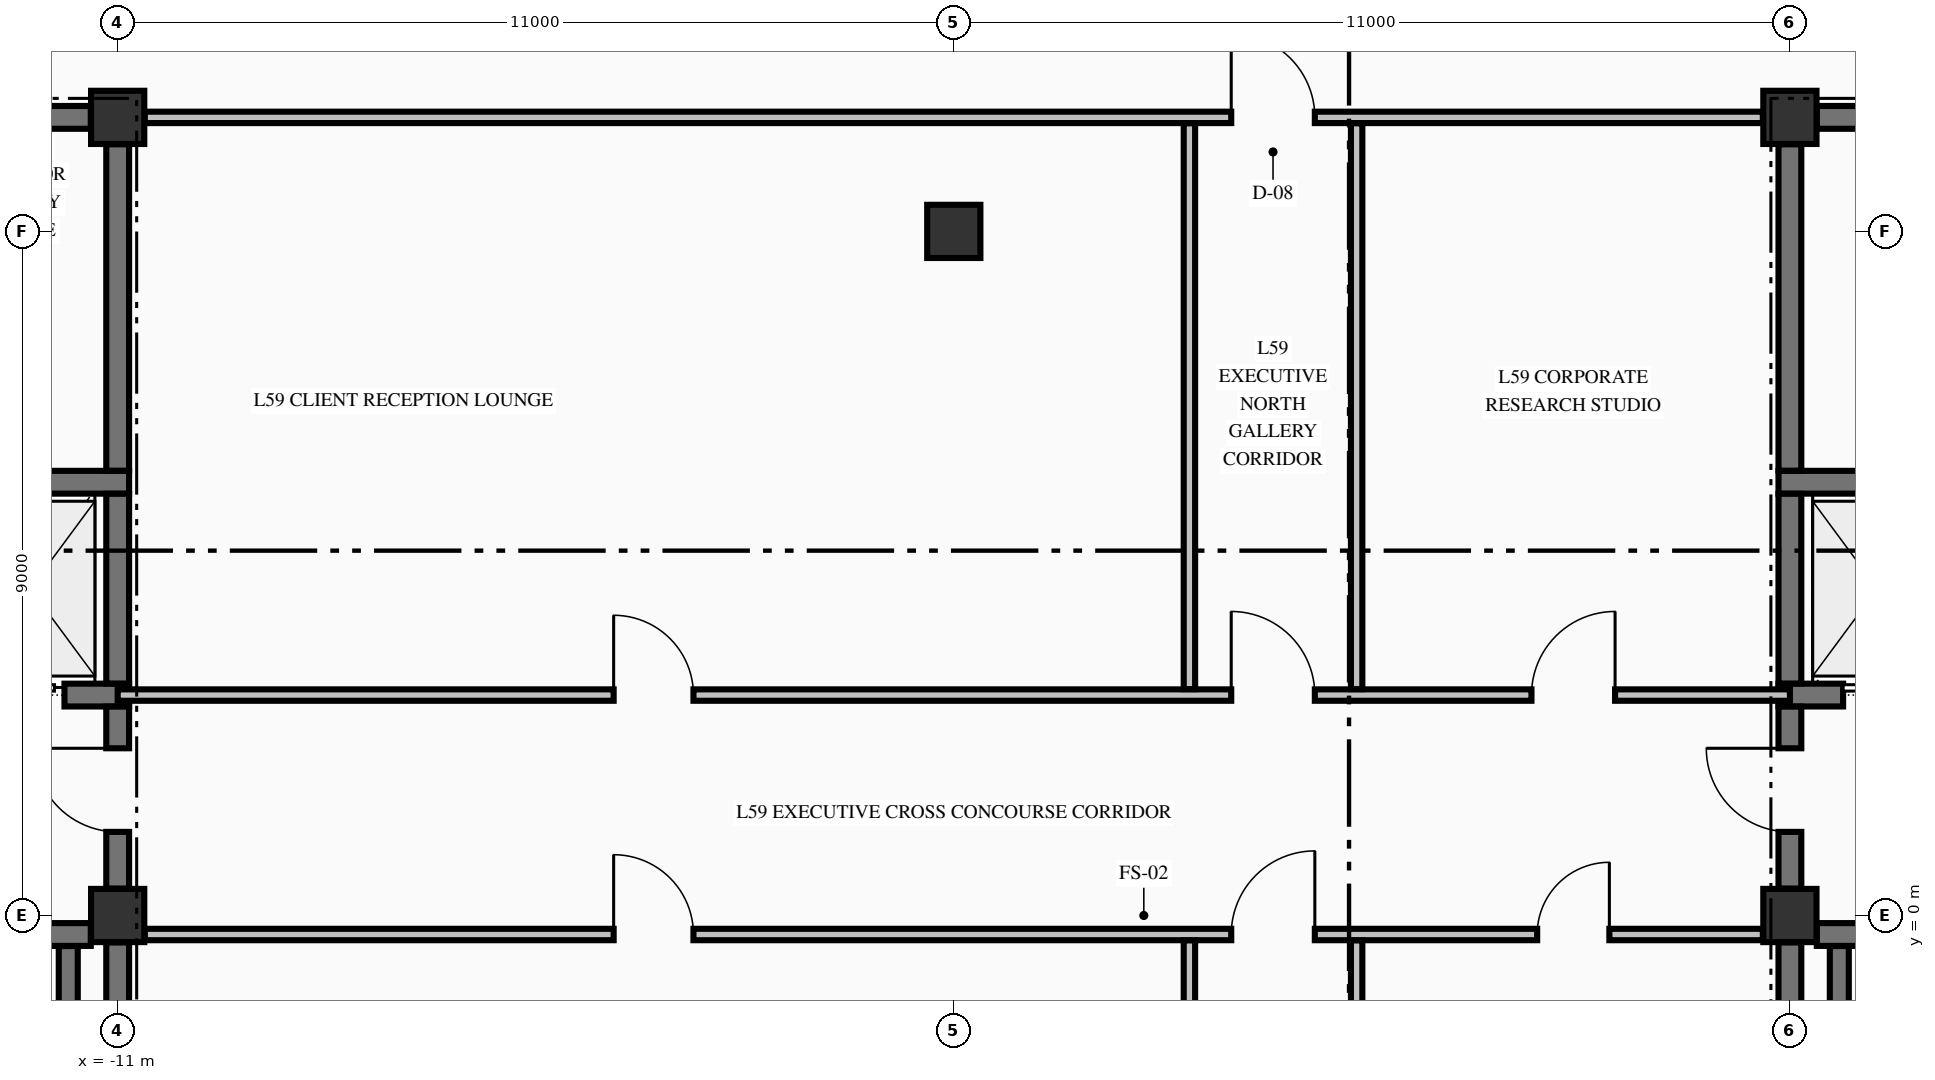
"""IFC4 building model, lengths in metres.
Left out: names, types, materials, properties, quantities, classifications, styles, units other than length and angle.
Written with IfcOpenShell. Run it as: python <this file> out.ifc"""

import sys

from ifc_helpers import new_model, si_unit, direction, frame, frame_2d, origin, origin_2d, place, context, subcontext, project, spatial, rectangle, extrude, element, fill, save


model = new_model("IFC4")
c1 = context("Model", 3, precision=1e-05, world=origin(), true_north=direction((0.0, 1.0)))
c2 = subcontext(c1, "Body", "Model", "MODEL_VIEW")
j1 = project(units=[si_unit("LENGTHUNIT", "METRE"), si_unit("PLANEANGLEUNIT", "RADIAN")], contexts=[c1])
p1 = place(None, origin())
s1 = spatial("IfcSite", under=j1, at=p1, CompositionType="ELEMENT")
p2 = place(p1, origin())
s2 = spatial("IfcBuilding", under=s1, at=p2, CompositionType="ELEMENT")
p3 = place(p2, frame((0.0, 0.0, 226.82)))
s3 = spatial("IfcBuildingStorey", under=s2, at=p3, CompositionType="ELEMENT", Elevation=226.82)
for number, where, z_axis, x_axis in (
    (1, (-11.0, 0.0, -0.425), (0.0, 0.0, 1.0), (1.0, 0.0, 0.0)),
    (2, (-11.0, 10.5, -0.425), (0.0, 0.0, 1.0), (1.0, 0.0, 0.0)),
    (3, (11.0, 0.0, -0.425), (0.0, 0.0, 1.0), (1.0, 0.0, 0.0)),
    (4, (11.0, 10.5, -0.425), (0.0, 0.0, 1.0), (1.0, 0.0, 0.0)),
    (5, (0.0, 9.0, -0.425), (0.0, 0.0, 1.0), (1.0, 0.0, 0.0)),
):
    element("IfcColumn", number, at=place(p3, frame(where, z_axis=z_axis, x_axis=x_axis)), inside=s3, PredefinedType="COLUMN", context=c2, shape_type="SweptSolid", body=[
        extrude(rectangle(XDim=0.7, YDim=0.7, at=origin_2d()), origin(), (0.0, 0.0, 1.0), 3.405),
    ])
p4 = place(p3, frame((-20.571, -0.25, 0.0), z_axis=(0.0, 0.0, 1.0), x_axis=(1.0, 0.0, 0.0)))
e6 = element("IfcWall", 6, at=p4, inside=s3, PredefinedType="SHEAR", context=c2, shape_type="SweptSolid", body=[
    extrude(rectangle(XDim=9.217, YDim=0.3, at=frame_2d((4.608, 0.0))), origin(), (0.0, 0.0, 1.0), 2.98),
])
p5 = place(p4, frame((6.871, 0.0, 0.0)))
e7 = element("IfcOpeningElement", 7, at=p5, cuts=e6, PredefinedType="OPENING", context=c2, shape_type="SweptSolid", body=[
    extrude(rectangle(XDim=1.1, YDim=2.15, at=frame_2d((0.55, 1.075))), frame((0.0, 0.16, 0.0), z_axis=(0.0, -1.0, 0.0), x_axis=(1.0, 0.0, 0.0)), (0.0, 0.0, 1.0), 0.32),
])
p6 = place(p3, frame((11.354, -0.25, 0.0), z_axis=(0.0, 0.0, 1.0), x_axis=(1.0, 0.0, 0.0)))
e8 = element("IfcWall", 8, at=p6, inside=s3, PredefinedType="SHEAR", context=c2, shape_type="SweptSolid", body=[
    extrude(rectangle(XDim=3.521, YDim=0.3, at=frame_2d((1.76, 0.0))), origin(), (0.0, 0.0, 1.0), 2.98),
])
p7 = place(p6, frame((1.246, 0.0, 0.0)))
e9 = element("IfcOpeningElement", 9, at=p7, cuts=e8, PredefinedType="OPENING", context=c2, shape_type="SweptSolid", body=[
    extrude(rectangle(XDim=1.1, YDim=2.15, at=frame_2d((0.55, 1.075))), frame((0.0, 0.16, 0.0), z_axis=(0.0, -1.0, 0.0), x_axis=(1.0, 0.0, 0.0)), (0.0, 0.0, 1.0), 0.32),
])
p8 = place(p3, frame((-14.875, 2.9, 0.0), z_axis=(0.0, 0.0, 1.0), x_axis=(1.0, 0.0, 0.0)))
e10 = element("IfcWall", 10, at=p8, inside=s3, PredefinedType="SHEAR", context=c2, shape_type="SweptSolid", body=[
    extrude(rectangle(XDim=4.025, YDim=0.3, at=frame_2d((2.012, 0.0))), origin(), (0.0, 0.0, 1.0), 2.98),
])
p9 = place(p8, frame((2.075, 0.0, 0.0)))
e11 = element("IfcOpeningElement", 11, at=p9, cuts=e10, PredefinedType="OPENING", context=c2, shape_type="SweptSolid", body=[
    extrude(rectangle(XDim=1.1, YDim=2.2, at=frame_2d((0.55, 1.1))), frame((0.0, 0.16, 0.0), z_axis=(0.0, -1.0, 0.0), x_axis=(1.0, 0.0, 0.0)), (0.0, 0.0, 1.0), 0.32),
])
p10 = place(p3, frame((10.85, 2.9, 0.0), z_axis=(0.0, 0.0, 1.0), x_axis=(1.0, 0.0, 0.0)))
e12 = element("IfcWall", 12, at=p10, inside=s3, PredefinedType="SHEAR", context=c2, shape_type="SweptSolid", body=[
    extrude(rectangle(XDim=4.025, YDim=0.3, at=frame_2d((2.012, 0.0))), origin(), (0.0, 0.0, 1.0), 2.98),
])
p11 = place(p10, frame((0.85, 0.0, 0.0)))
e13 = element("IfcOpeningElement", 13, at=p11, cuts=e12, PredefinedType="OPENING", context=c2, shape_type="SweptSolid", body=[
    extrude(rectangle(XDim=1.1, YDim=2.2, at=frame_2d((0.55, 1.1))), frame((0.0, 0.16, 0.0), z_axis=(0.0, -1.0, 0.0), x_axis=(1.0, 0.0, 0.0)), (0.0, 0.0, 1.0), 0.32),
])
for number, where, z_axis, x_axis in (
    (14, (-14.875, 5.7, 0.0), (0.0, 0.0, 1.0), (1.0, 0.0, 0.0)),
    (15, (10.85, 5.7, 0.0), (0.0, 0.0, 1.0), (1.0, 0.0, 0.0)),
):
    element("IfcWall", number, at=place(p3, frame(where, z_axis=z_axis, x_axis=x_axis)), inside=s3, PredefinedType="SHEAR", context=c2, shape_type="SweptSolid", body=[
        extrude(rectangle(XDim=4.025, YDim=0.3, at=frame_2d((2.012, 0.0))), origin(), (0.0, 0.0, 1.0), 2.98),
    ])
p12 = place(p3, frame((-14.7, 10.5, 0.0), z_axis=(0.0, 0.0, 1.0), x_axis=(1.0, 0.0, 0.0)))
e16 = element("IfcWall", 16, at=p12, inside=s3, PredefinedType="SHEAR", context=c2, shape_type="SweptSolid", body=[
    extrude(rectangle(XDim=3.346, YDim=0.3, at=frame_2d((1.673, 0.0))), origin(), (0.0, 0.0, 1.0), 2.98),
])
p13 = place(p12, frame((0.245, 0.0, 0.0)))
e17 = element("IfcOpeningElement", 17, at=p13, cuts=e16, PredefinedType="OPENING", context=c2, shape_type="SweptSolid", body=[
    extrude(rectangle(XDim=0.95, YDim=2.15, at=frame_2d((0.475, 1.075))), frame((0.0, 0.16, 0.0), z_axis=(0.0, -1.0, 0.0), x_axis=(1.0, 0.0, 0.0)), (0.0, 0.0, 1.0), 0.32),
])
p14 = place(p3, frame((11.354, 10.5, 0.0), z_axis=(0.0, 0.0, 1.0), x_axis=(1.0, 0.0, 0.0)))
e18 = element("IfcWall", 18, at=p14, inside=s3, PredefinedType="SHEAR", context=c2, shape_type="SweptSolid", body=[
    extrude(rectangle(XDim=3.346, YDim=0.3, at=frame_2d((1.673, 0.0))), origin(), (0.0, 0.0, 1.0), 2.98),
])
p15 = place(p14, frame((1.621, 0.0, 0.0)))
e19 = element("IfcOpeningElement", 19, at=p15, cuts=e18, PredefinedType="OPENING", context=c2, shape_type="SweptSolid", body=[
    extrude(rectangle(XDim=0.95, YDim=2.15, at=frame_2d((0.475, 1.075))), frame((0.0, 0.16, 0.0), z_axis=(0.0, -1.0, 0.0), x_axis=(1.0, 0.0, 0.0)), (0.0, 0.0, 1.0), 0.32),
])
p16 = place(p3, frame((-10.644, -0.25, 0.0), z_axis=(0.0, 0.0, 1.0), x_axis=(1.0, 0.0, 0.0)))
e20 = element("IfcWall", 20, at=p16, inside=s3, PredefinedType="PARTITIONING", context=c2, shape_type="SweptSolid", body=[
    extrude(rectangle(XDim=21.288, YDim=0.15, at=frame_2d((10.644, 0.0))), origin(), (0.0, 0.0, 1.0), 2.98),
])
p17 = place(p16, frame((14.294, 0.0, 0.0)))
e21 = element("IfcOpeningElement", 21, at=p17, cuts=e20, PredefinedType="OPENING", context=c2, shape_type="SweptSolid", body=[
    extrude(rectangle(XDim=1.1, YDim=2.15, at=frame_2d((0.55, 1.075))), frame((0.0, 0.085, 0.0), z_axis=(0.0, -1.0, 0.0), x_axis=(1.0, 0.0, 0.0)), (0.0, 0.0, 1.0), 0.17),
])
p18 = place(p16, frame((6.169, 0.0, 0.0)))
e22 = element("IfcOpeningElement", 22, at=p18, cuts=e20, PredefinedType="OPENING", context=c2, shape_type="SweptSolid", body=[
    extrude(rectangle(XDim=1.05, YDim=2.15, at=frame_2d((0.525, 1.075))), frame((0.0, 0.085, 0.0), z_axis=(0.0, -1.0, 0.0), x_axis=(1.0, 0.0, 0.0)), (0.0, 0.0, 1.0), 0.17),
])
p19 = place(p16, frame((18.319, 0.0, 0.0)))
e23 = element("IfcOpeningElement", 23, at=p19, cuts=e20, PredefinedType="OPENING", context=c2, shape_type="SweptSolid", body=[
    extrude(rectangle(XDim=0.95, YDim=2.15, at=frame_2d((0.475, 1.075))), frame((0.0, 0.085, 0.0), z_axis=(0.0, -1.0, 0.0), x_axis=(1.0, 0.0, 0.0)), (0.0, 0.0, 1.0), 0.17),
])
p20 = place(p3, frame((-11.0, 2.9, 0.0), z_axis=(0.0, 0.0, 1.0), x_axis=(1.0, 0.0, 0.0)))
e24 = element("IfcWall", 24, at=p20, inside=s3, PredefinedType="PARTITIONING", context=c2, shape_type="SweptSolid", body=[
    extrude(rectangle(XDim=22.0, YDim=0.15, at=frame_2d((11.0, 0.0))), origin(), (0.0, 0.0, 1.0), 2.98),
])
p21 = place(p20, frame((14.65, 0.0, 0.0)))
e25 = element("IfcOpeningElement", 25, at=p21, cuts=e24, PredefinedType="OPENING", context=c2, shape_type="SweptSolid", body=[
    extrude(rectangle(XDim=1.1, YDim=2.15, at=frame_2d((0.55, 1.075))), frame((0.0, 0.085, 0.0), z_axis=(0.0, -1.0, 0.0), x_axis=(1.0, 0.0, 0.0)), (0.0, 0.0, 1.0), 0.17),
])
p22 = place(p20, frame((6.525, 0.0, 0.0)))
e26 = element("IfcOpeningElement", 26, at=p22, cuts=e24, PredefinedType="OPENING", context=c2, shape_type="SweptSolid", body=[
    extrude(rectangle(XDim=1.05, YDim=2.15, at=frame_2d((0.525, 1.075))), frame((0.0, 0.085, 0.0), z_axis=(0.0, -1.0, 0.0), x_axis=(1.0, 0.0, 0.0)), (0.0, 0.0, 1.0), 0.17),
])
p23 = place(p20, frame((18.6, 0.0, 0.0)))
e27 = element("IfcOpeningElement", 27, at=p23, cuts=e24, PredefinedType="OPENING", context=c2, shape_type="SweptSolid", body=[
    extrude(rectangle(XDim=1.1, YDim=2.15, at=frame_2d((0.55, 1.075))), frame((0.0, 0.085, 0.0), z_axis=(0.0, -1.0, 0.0), x_axis=(1.0, 0.0, 0.0)), (0.0, 0.0, 1.0), 0.17),
])
p24 = place(p3, frame((-10.644, 10.5, 0.0), z_axis=(0.0, 0.0, 1.0), x_axis=(1.0, 0.0, 0.0)))
e28 = element("IfcWall", 28, at=p24, inside=s3, PredefinedType="PARTITIONING", context=c2, shape_type="SweptSolid", body=[
    extrude(rectangle(XDim=21.288, YDim=0.15, at=frame_2d((10.644, 0.0))), origin(), (0.0, 0.0, 1.0), 2.98),
])
p25 = place(p24, frame((14.294, 0.0, 0.0)))
e29 = element("IfcOpeningElement", 29, at=p25, cuts=e28, PredefinedType="OPENING", context=c2, shape_type="SweptSolid", body=[
    extrude(rectangle(XDim=1.1, YDim=2.15, at=frame_2d((0.55, 1.075))), frame((0.0, 0.085, 0.0), z_axis=(0.0, -1.0, 0.0), x_axis=(1.0, 0.0, 0.0)), (0.0, 0.0, 1.0), 0.17),
])
p26 = place(p3, frame((-11.65, -9.798, 0.0), z_axis=(0.0, 0.0, 1.0), x_axis=(0.0, 1.0, 0.0)))
e30 = element("IfcWall", 30, at=p26, inside=s3, PredefinedType="SOLIDWALL", context=c2, shape_type="SweptSolid", body=[
    extrude(rectangle(XDim=9.396, YDim=0.25, at=frame_2d((4.698, 0.0))), origin(), (0.0, 0.0, 1.0), 2.98),
])
p27 = place(p3, frame((-11.0, -9.596, 0.0), z_axis=(0.0, 0.0, 1.0), x_axis=(0.0, 1.0, 0.0)))
e31 = element("IfcWall", 31, at=p27, inside=s3, PredefinedType="SHEAR", context=c2, shape_type="SweptSolid", body=[
    extrude(rectangle(XDim=9.242, YDim=0.3, at=frame_2d((4.621, 0.0))), origin(), (0.0, 0.0, 1.0), 2.98),
])
p28 = place(p3, frame((-11.0, 0.354, 0.0), z_axis=(0.0, 0.0, 1.0), x_axis=(0.0, 1.0, 0.0)))
e32 = element("IfcWall", 32, at=p28, inside=s3, PredefinedType="SHEAR", context=c2, shape_type="SweptSolid", body=[
    extrude(rectangle(XDim=2.394, YDim=0.3, at=frame_2d((1.197, 0.0))), origin(), (0.0, 0.0, 1.0), 2.98),
])
p29 = place(p28, frame((0.746, 0.0, 0.0)))
e33 = element("IfcOpeningElement", 33, at=p29, cuts=e32, PredefinedType="OPENING", context=c2, shape_type="SweptSolid", body=[
    extrude(rectangle(XDim=1.1, YDim=2.15, at=frame_2d((0.55, 1.075))), frame((0.0, 0.16, 0.0), z_axis=(0.0, -1.0, 0.0), x_axis=(1.0, 0.0, 0.0)), (0.0, 0.0, 1.0), 0.32),
])
p30 = place(p3, frame((-11.0, 3.052, 0.0), z_axis=(0.0, 0.0, 1.0), x_axis=(0.0, 1.0, 0.0)))
e34 = element("IfcWall", 34, at=p30, inside=s3, PredefinedType="SHEAR", context=c2, shape_type="SweptSolid", body=[
    extrude(rectangle(XDim=2.496, YDim=0.3, at=frame_2d((1.248, 0.0))), origin(), (0.0, 0.0, 1.0), 2.98),
])
p31 = place(p3, frame((-11.0, 5.852, 0.0), z_axis=(0.0, 0.0, 1.0), x_axis=(0.0, 1.0, 0.0)))
e35 = element("IfcWall", 35, at=p31, inside=s3, PredefinedType="SHEAR", context=c2, shape_type="SweptSolid", body=[
    extrude(rectangle(XDim=4.294, YDim=0.3, at=frame_2d((2.147, 0.0))), origin(), (0.0, 0.0, 1.0), 2.98),
])
p32 = place(p3, frame((11.0, -9.596, 0.0), z_axis=(0.0, 0.0, 1.0), x_axis=(0.0, 1.0, 0.0)))
e36 = element("IfcWall", 36, at=p32, inside=s3, PredefinedType="SHEAR", context=c2, shape_type="SweptSolid", body=[
    extrude(rectangle(XDim=9.242, YDim=0.3, at=frame_2d((4.621, 0.0))), origin(), (0.0, 0.0, 1.0), 2.98),
])
p33 = place(p3, frame((11.0, 0.354, 0.0), z_axis=(0.0, 0.0, 1.0), x_axis=(0.0, 1.0, 0.0)))
e37 = element("IfcWall", 37, at=p33, inside=s3, PredefinedType="SHEAR", context=c2, shape_type="SweptSolid", body=[
    extrude(rectangle(XDim=2.394, YDim=0.3, at=frame_2d((1.197, 0.0))), origin(), (0.0, 0.0, 1.0), 2.98),
])
p34 = place(p33, frame((0.746, 0.0, 0.0)))
e38 = element("IfcOpeningElement", 38, at=p34, cuts=e37, PredefinedType="OPENING", context=c2, shape_type="SweptSolid", body=[
    extrude(rectangle(XDim=1.1, YDim=2.15, at=frame_2d((0.55, 1.075))), frame((0.0, 0.16, 0.0), z_axis=(0.0, -1.0, 0.0), x_axis=(1.0, 0.0, 0.0)), (0.0, 0.0, 1.0), 0.32),
])
p35 = place(p3, frame((11.0, 3.052, 0.0), z_axis=(0.0, 0.0, 1.0), x_axis=(0.0, 1.0, 0.0)))
e39 = element("IfcWall", 39, at=p35, inside=s3, PredefinedType="SHEAR", context=c2, shape_type="SweptSolid", body=[
    extrude(rectangle(XDim=2.496, YDim=0.3, at=frame_2d((1.248, 0.0))), origin(), (0.0, 0.0, 1.0), 2.98),
])
p36 = place(p3, frame((11.0, 5.852, 0.0), z_axis=(0.0, 0.0, 1.0), x_axis=(0.0, 1.0, 0.0)))
e40 = element("IfcWall", 40, at=p36, inside=s3, PredefinedType="SHEAR", context=c2, shape_type="SweptSolid", body=[
    extrude(rectangle(XDim=4.294, YDim=0.3, at=frame_2d((2.147, 0.0))), origin(), (0.0, 0.0, 1.0), 2.98),
])
p37 = place(p3, frame((11.65, -9.798, 0.0), z_axis=(0.0, 0.0, 1.0), x_axis=(0.0, 1.0, 0.0)))
e41 = element("IfcWall", 41, at=p37, inside=s3, PredefinedType="SOLIDWALL", context=c2, shape_type="SweptSolid", body=[
    extrude(rectangle(XDim=9.396, YDim=0.25, at=frame_2d((4.698, 0.0))), origin(), (0.0, 0.0, 1.0), 2.98),
])
p38 = place(p3, frame((3.1, -9.872, 0.0), z_axis=(0.0, 0.0, 1.0), x_axis=(0.0, 1.0, 0.0)))
e42 = element("IfcWall", 42, at=p38, inside=s3, PredefinedType="PARTITIONING", context=c2, shape_type="SweptSolid", body=[
    extrude(rectangle(XDim=9.544, YDim=0.15, at=frame_2d((4.772, 0.0))), origin(), (0.0, 0.0, 1.0), 2.98),
])
p39 = place(p3, frame((3.1, 2.978, 0.0), z_axis=(0.0, 0.0, 1.0), x_axis=(0.0, 1.0, 0.0)))
e43 = element("IfcWall", 43, at=p39, inside=s3, PredefinedType="PARTITIONING", context=c2, shape_type="SweptSolid", body=[
    extrude(rectangle(XDim=7.444, YDim=0.15, at=frame_2d((3.722, 0.0))), origin(), (0.0, 0.0, 1.0), 2.98),
])
p40 = place(p3, frame((5.3, -4.747, 0.0), z_axis=(0.0, 0.0, 1.0), x_axis=(0.0, 1.0, 0.0)))
e44 = element("IfcWall", 44, at=p40, inside=s3, PredefinedType="PARTITIONING", context=c2, shape_type="SweptSolid", body=[
    extrude(rectangle(XDim=4.419, YDim=0.15, at=frame_2d((2.209, 0.0))), origin(), (0.0, 0.0, 1.0), 2.98),
])
p41 = place(p3, frame((5.3, 2.978, 0.0), z_axis=(0.0, 0.0, 1.0), x_axis=(0.0, 1.0, 0.0)))
e45 = element("IfcWall", 45, at=p41, inside=s3, PredefinedType="PARTITIONING", context=c2, shape_type="SweptSolid", body=[
    extrude(rectangle(XDim=7.444, YDim=0.15, at=frame_2d((3.722, 0.0))), origin(), (0.0, 0.0, 1.0), 2.98),
])
p42 = place(p29, origin())
e46 = element("IfcDoor", 46, at=p42, inside=s3, OperationType="SINGLE_SWING_RIGHT", PredefinedType="DOOR", context=c2, shape_type="SweptSolid", body=[
    extrude(rectangle(XDim=1.1, YDim=2.15, at=frame_2d((0.55, 1.075))), frame((0.0, 0.025, 0.0), z_axis=(0.0, -1.0, 0.0), x_axis=(1.0, 0.0, 0.0)), (0.0, 0.0, 1.0), 0.05),
])
fill(e33, e46)
p43 = place(p9, origin())
e47 = element("IfcDoor", 47, at=p43, inside=s3, OperationType="SLIDING_TO_LEFT", PredefinedType="DOOR", context=c2, shape_type="SweptSolid", body=[
    extrude(rectangle(XDim=1.1, YDim=2.2, at=frame_2d((0.55, 1.1))), frame((0.0, 0.025, 0.0), z_axis=(0.0, -1.0, 0.0), x_axis=(1.0, 0.0, 0.0)), (0.0, 0.0, 1.0), 0.05),
])
fill(e11, e47)
p44 = place(p34, origin())
e48 = element("IfcDoor", 48, at=p44, inside=s3, OperationType="SINGLE_SWING_RIGHT", PredefinedType="DOOR", context=c2, shape_type="SweptSolid", body=[
    extrude(rectangle(XDim=1.1, YDim=2.15, at=frame_2d((0.55, 1.075))), frame((0.0, 0.025, 0.0), z_axis=(0.0, -1.0, 0.0), x_axis=(1.0, 0.0, 0.0)), (0.0, 0.0, 1.0), 0.05),
])
fill(e38, e48)
p45 = place(p11, origin())
e49 = element("IfcDoor", 49, at=p45, inside=s3, OperationType="SLIDING_TO_RIGHT", PredefinedType="DOOR", context=c2, shape_type="SweptSolid", body=[
    extrude(rectangle(XDim=1.1, YDim=2.2, at=frame_2d((0.55, 1.1))), frame((0.0, 0.025, 0.0), z_axis=(0.0, -1.0, 0.0), x_axis=(1.0, 0.0, 0.0)), (0.0, 0.0, 1.0), 0.05),
])
fill(e13, e49)
p46 = place(p25, origin())
e50 = element("IfcDoor", 50, at=p46, inside=s3, OperationType="SINGLE_SWING_LEFT", PredefinedType="DOOR", context=c2, shape_type="SweptSolid", body=[
    extrude(rectangle(XDim=1.1, YDim=2.15, at=frame_2d((0.55, 1.075))), frame((0.0, 0.025, 0.0), z_axis=(0.0, -1.0, 0.0), x_axis=(1.0, 0.0, 0.0)), (0.0, 0.0, 1.0), 0.05),
])
fill(e29, e50)
p47 = place(p21, origin())
e51 = element("IfcDoor", 51, at=p47, inside=s3, OperationType="SINGLE_SWING_LEFT", PredefinedType="DOOR", context=c2, shape_type="SweptSolid", body=[
    extrude(rectangle(XDim=1.1, YDim=2.15, at=frame_2d((0.55, 1.075))), frame((0.0, 0.025, 0.0), z_axis=(0.0, -1.0, 0.0), x_axis=(1.0, 0.0, 0.0)), (0.0, 0.0, 1.0), 0.05),
])
fill(e25, e51)
p48 = place(p17, origin())
e52 = element("IfcDoor", 52, at=p48, inside=s3, OperationType="SINGLE_SWING_RIGHT", PredefinedType="DOOR", context=c2, shape_type="SweptSolid", body=[
    extrude(rectangle(XDim=1.1, YDim=2.15, at=frame_2d((0.55, 1.075))), frame((0.0, 0.025, 0.0), z_axis=(0.0, -1.0, 0.0), x_axis=(1.0, 0.0, 0.0)), (0.0, 0.0, 1.0), 0.05),
])
fill(e21, e52)
p49 = place(p22, origin())
e53 = element("IfcDoor", 53, at=p49, inside=s3, OperationType="SINGLE_SWING_LEFT", PredefinedType="DOOR", context=c2, shape_type="SweptSolid", body=[
    extrude(rectangle(XDim=1.05, YDim=2.15, at=frame_2d((0.525, 1.075))), frame((0.0, 0.025, 0.0), z_axis=(0.0, -1.0, 0.0), x_axis=(1.0, 0.0, 0.0)), (0.0, 0.0, 1.0), 0.05),
])
fill(e26, e53)
p50 = place(p23, origin())
e54 = element("IfcDoor", 54, at=p50, inside=s3, OperationType="SINGLE_SWING_RIGHT", PredefinedType="DOOR", context=c2, shape_type="SweptSolid", body=[
    extrude(rectangle(XDim=1.1, YDim=2.15, at=frame_2d((0.55, 1.075))), frame((0.0, 0.025, 0.0), z_axis=(0.0, -1.0, 0.0), x_axis=(1.0, 0.0, 0.0)), (0.0, 0.0, 1.0), 0.05),
])
fill(e27, e54)
p51 = place(p18, origin())
e55 = element("IfcDoor", 55, at=p51, inside=s3, OperationType="SINGLE_SWING_LEFT", PredefinedType="DOOR", context=c2, shape_type="SweptSolid", body=[
    extrude(rectangle(XDim=1.05, YDim=2.15, at=frame_2d((0.525, 1.075))), frame((0.0, 0.025, 0.0), z_axis=(0.0, -1.0, 0.0), x_axis=(1.0, 0.0, 0.0)), (0.0, 0.0, 1.0), 0.05),
])
fill(e22, e55)
p52 = place(p19, origin())
e56 = element("IfcDoor", 56, at=p52, inside=s3, OperationType="SINGLE_SWING_RIGHT", PredefinedType="DOOR", context=c2, shape_type="SweptSolid", body=[
    extrude(rectangle(XDim=0.95, YDim=2.15, at=frame_2d((0.475, 1.075))), frame((0.0, 0.025, 0.0), z_axis=(0.0, -1.0, 0.0), x_axis=(1.0, 0.0, 0.0)), (0.0, 0.0, 1.0), 0.05),
])
fill(e23, e56)
save(model, sys.argv[1])
